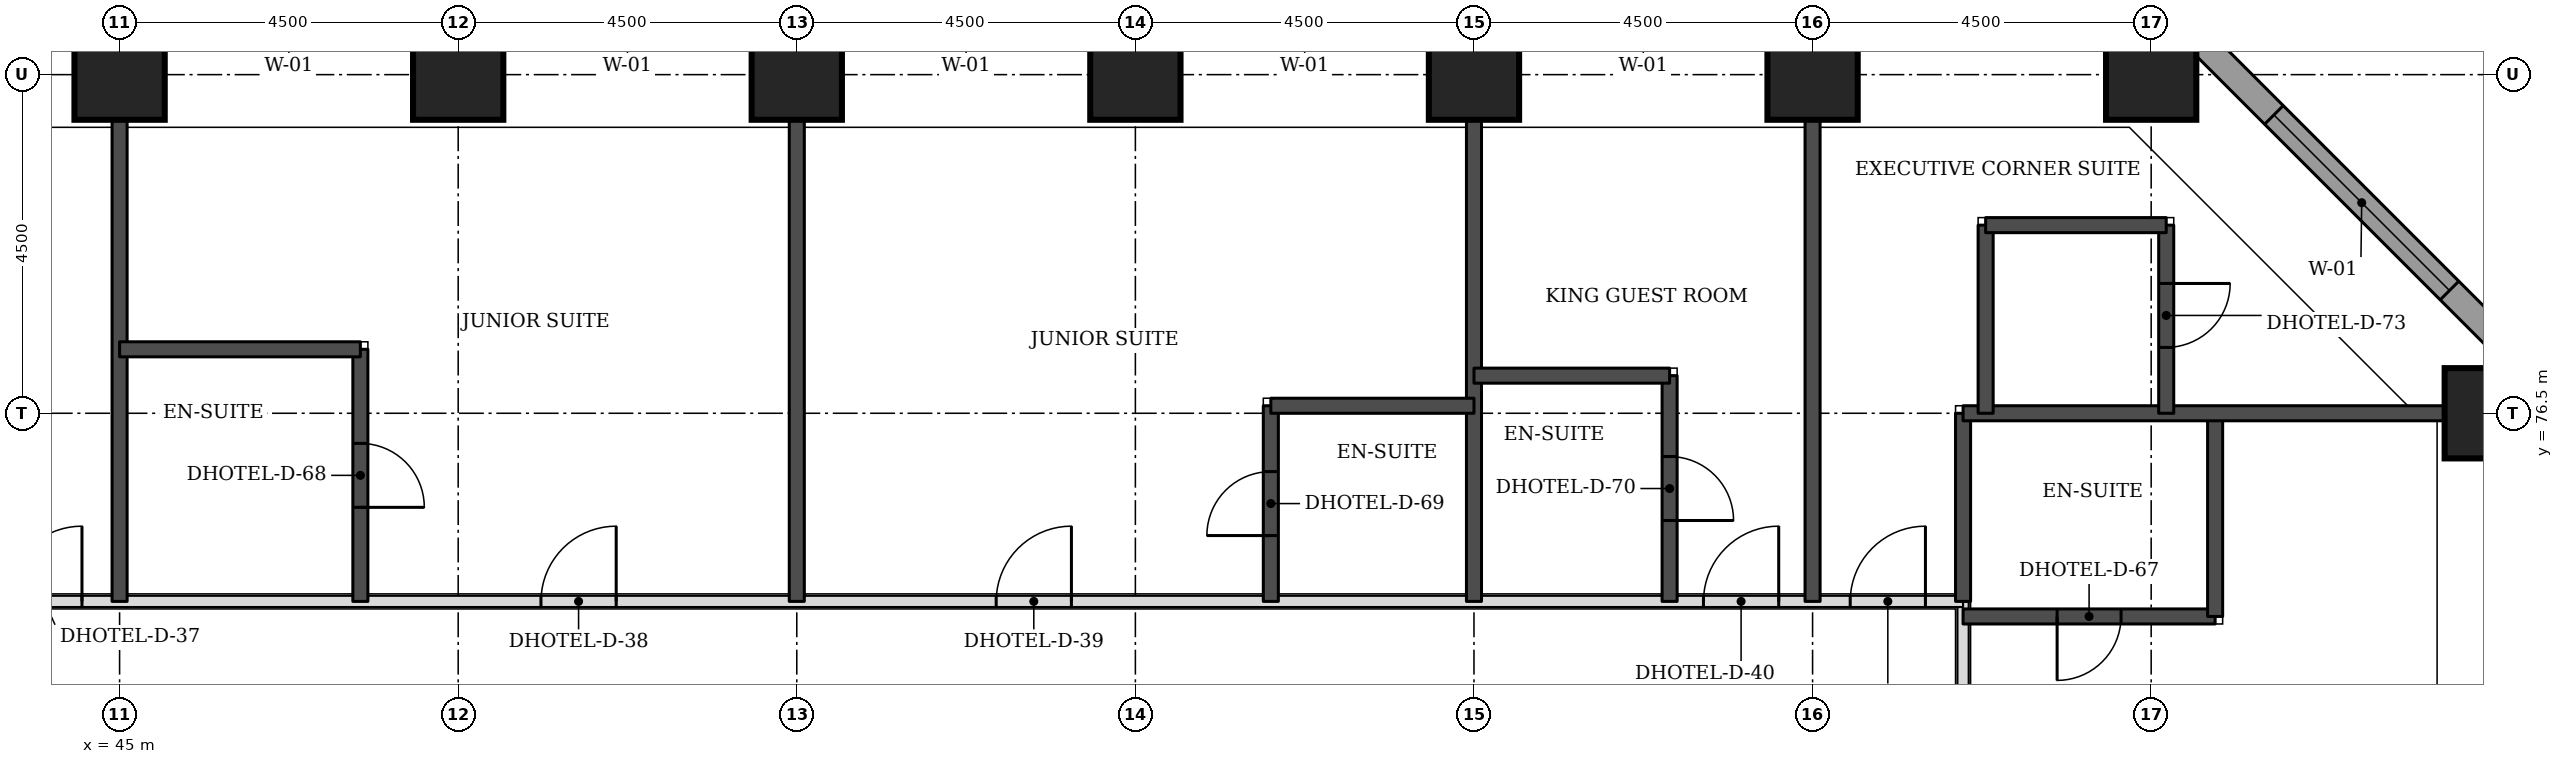
"""IFC4 building model, lengths in metres.
Left out: names, types, materials, properties, quantities, classifications, styles, units other than length and angle.
Written with IfcOpenShell. Run it as: python <this file> out.ifc"""

import sys

from ifc_helpers import new_model, si_unit, direction, frame, frame_2d, origin, origin_2d, place, context, subcontext, project, spatial, rectangle, extrude, element, fill, save


model = new_model("IFC4")
c1 = context("Model", 3, precision=1e-05, world=origin(), true_north=direction((0.0, 1.0)))
c2 = subcontext(c1, "Body", "Model", "MODEL_VIEW")
j1 = project(units=[si_unit("LENGTHUNIT", "METRE"), si_unit("PLANEANGLEUNIT", "RADIAN")], contexts=[c1])
p1 = place(None, origin())
s1 = spatial("IfcSite", under=j1, at=p1, CompositionType="ELEMENT")
p2 = place(p1, origin())
s2 = spatial("IfcBuilding", under=s1, at=p2, CompositionType="ELEMENT")
p3 = place(p2, frame((0.0, 0.0, 59.4)))
s3 = spatial("IfcBuildingStorey", under=s2, at=p3, CompositionType="ELEMENT", Elevation=59.4)
for number, where, z_axis, x_axis in (
    (1, (76.5, 76.5, 0.0), (0.0, 0.0, 1.0), (1.0, 0.0, 0.0)),
    (2, (45.0, 81.0, 0.0), (0.0, 0.0, 1.0), (1.0, 0.0, 0.0)),
    (3, (49.5, 81.0, 0.0), (0.0, 0.0, 1.0), (1.0, 0.0, 0.0)),
    (4, (54.0, 81.0, 0.0), (0.0, 0.0, 1.0), (1.0, 0.0, 0.0)),
    (5, (58.5, 81.0, 0.0), (0.0, 0.0, 1.0), (1.0, 0.0, 0.0)),
    (6, (63.0, 81.0, 0.0), (0.0, 0.0, 1.0), (1.0, 0.0, 0.0)),
    (7, (67.5, 81.0, 0.0), (0.0, 0.0, 1.0), (1.0, 0.0, 0.0)),
    (8, (72.0, 81.0, 0.0), (0.0, 0.0, 1.0), (1.0, 0.0, 0.0)),
):
    element("IfcColumn", number, at=place(p3, frame(where, z_axis=z_axis, x_axis=x_axis)), inside=s3, PredefinedType="COLUMN", context=c2, shape_type="SweptSolid", body=[
        extrude(rectangle(XDim=1.2, YDim=1.2, at=origin_2d()), origin(), (0.0, 0.0, 1.0), 3.3),
    ])
p4 = place(p3, frame((77.326, 76.77, 0.0), z_axis=(0.0, 0.0, 1.0), x_axis=(-0.707106781187, 0.707106781187, 0.0)))
e9 = element("IfcWall", 9, at=p4, inside=s3, PredefinedType="STANDARD", context=c2, shape_type="SweptSolid", body=[
    extrude(rectangle(XDim=7.151, YDim=0.35, at=frame_2d((3.576, 0.0))), origin(), (0.0, 0.0, 1.0), 3.055),
])
p5 = place(p4, frame((1.926, 0.0, 0.8)))
e10 = element("IfcOpeningElement", 10, at=p5, cuts=e9, PredefinedType="OPENING", context=c2, shape_type="SweptSolid", body=[
    extrude(rectangle(XDim=3.3, YDim=1.5, at=frame_2d((1.65, 0.75))), frame((0.0, 0.185, 0.0), z_axis=(0.0, -1.0, 0.0), x_axis=(1.0, 0.0, 0.0)), (0.0, 0.0, 1.0), 0.37),
])
p6 = place(p3, frame((69.5, 47.5, 0.0), z_axis=(0.0, 0.0, 1.0), x_axis=(0.0, 1.0, 0.0)))
e11 = element("IfcWall", 11, at=p6, inside=s3, PredefinedType="PARTITIONING", context=c2, shape_type="SweptSolid", body=[
    extrude(rectangle(XDim=26.5, YDim=0.15, at=frame_2d((13.25, 0.0))), origin(), (0.0, 0.0, 1.0), 3.08),
])
p7 = place(p6, frame((22.65, 0.0, 0.0)))
e12 = element("IfcOpeningElement", 12, at=p7, cuts=e11, PredefinedType="OPENING", context=c2, shape_type="SweptSolid", body=[
    extrude(rectangle(XDim=1.0, YDim=2.1, at=frame_2d((0.5, 1.05))), frame((0.0, 0.085, 0.0), z_axis=(0.0, -1.0, 0.0), x_axis=(1.0, 0.0, 0.0)), (0.0, 0.0, 1.0), 0.17),
])
p8 = place(p6, frame((16.6, 0.0, 0.0)))
e13 = element("IfcOpeningElement", 13, at=p8, cuts=e11, PredefinedType="OPENING", context=c2, shape_type="SweptSolid", body=[
    extrude(rectangle(XDim=1.0, YDim=2.1, at=frame_2d((0.5, 1.05))), frame((0.0, 0.085, 0.0), z_axis=(0.0, -1.0, 0.0), x_axis=(1.0, 0.0, 0.0)), (0.0, 0.0, 1.0), 0.17),
])
p9 = place(p6, frame((4.25, 0.0, 0.0)))
e14 = element("IfcOpeningElement", 14, at=p9, cuts=e11, PredefinedType="OPENING", context=c2, shape_type="SweptSolid", body=[
    extrude(rectangle(XDim=1.1, YDim=2.1, at=frame_2d((0.55, 1.05))), frame((0.0, 0.085, 0.0), z_axis=(0.0, -1.0, 0.0), x_axis=(1.0, 0.0, 0.0)), (0.0, 0.0, 1.0), 0.17),
])
p10 = place(p6, frame((0.55, 0.0, 0.0)))
e15 = element("IfcOpeningElement", 15, at=p10, cuts=e11, PredefinedType="OPENING", context=c2, shape_type="SweptSolid", body=[
    extrude(rectangle(XDim=1.0, YDim=2.1, at=frame_2d((0.5, 1.05))), frame((0.0, 0.085, 0.0), z_axis=(0.0, -1.0, 0.0), x_axis=(1.0, 0.0, 0.0)), (0.0, 0.0, 1.0), 0.17),
])
p11 = place(p3, frame((43.0, 74.0, 0.0), z_axis=(0.0, 0.0, 1.0), x_axis=(1.0, 0.0, 0.0)))
e16 = element("IfcWall", 16, at=p11, inside=s3, PredefinedType="PARTITIONING", context=c2, shape_type="SweptSolid", body=[
    extrude(rectangle(XDim=26.5, YDim=0.15, at=frame_2d((13.25, 0.0))), origin(), (0.0, 0.0, 1.0), 3.08),
])
p12 = place(p11, frame((7.6, 0.0, 0.0)))
e17 = element("IfcOpeningElement", 17, at=p12, cuts=e16, PredefinedType="OPENING", context=c2, shape_type="SweptSolid", body=[
    extrude(rectangle(XDim=1.0, YDim=2.1, at=frame_2d((0.5, 1.05))), frame((0.0, 0.085, 0.0), z_axis=(0.0, -1.0, 0.0), x_axis=(1.0, 0.0, 0.0)), (0.0, 0.0, 1.0), 0.17),
])
p13 = place(p11, frame((13.65, 0.0, 0.0)))
e18 = element("IfcOpeningElement", 18, at=p13, cuts=e16, PredefinedType="OPENING", context=c2, shape_type="SweptSolid", body=[
    extrude(rectangle(XDim=1.0, YDim=2.1, at=frame_2d((0.5, 1.05))), frame((0.0, 0.085, 0.0), z_axis=(0.0, -1.0, 0.0), x_axis=(1.0, 0.0, 0.0)), (0.0, 0.0, 1.0), 0.17),
])
p14 = place(p11, frame((23.05, 0.0, 0.0)))
e19 = element("IfcOpeningElement", 19, at=p14, cuts=e16, PredefinedType="OPENING", context=c2, shape_type="SweptSolid", body=[
    extrude(rectangle(XDim=1.0, YDim=2.1, at=frame_2d((0.5, 1.05))), frame((0.0, 0.085, 0.0), z_axis=(0.0, -1.0, 0.0), x_axis=(1.0, 0.0, 0.0)), (0.0, 0.0, 1.0), 0.17),
])
p15 = place(p11, frame((0.5, 0.0, 0.0)))
e20 = element("IfcOpeningElement", 20, at=p15, cuts=e16, PredefinedType="OPENING", context=c2, shape_type="SweptSolid", body=[
    extrude(rectangle(XDim=1.0, YDim=2.1, at=frame_2d((0.5, 1.05))), frame((0.0, 0.085, 0.0), z_axis=(0.0, -1.0, 0.0), x_axis=(1.0, 0.0, 0.0)), (0.0, 0.0, 1.0), 0.17),
])
p16 = place(p11, frame((25.0, 0.0, 0.0)))
e21 = element("IfcOpeningElement", 21, at=p16, cuts=e16, PredefinedType="OPENING", context=c2, shape_type="SweptSolid", body=[
    extrude(rectangle(XDim=1.0, YDim=2.1, at=frame_2d((0.5, 1.05))), frame((0.0, 0.085, 0.0), z_axis=(0.0, -1.0, 0.0), x_axis=(1.0, 0.0, 0.0)), (0.0, 0.0, 1.0), 0.17),
])
p17 = place(p3, frame((69.5, 73.8, 0.0), z_axis=(0.0, 0.0, 1.0), x_axis=(1.0, 0.0, 0.0)))
e22 = element("IfcWall", 22, at=p17, inside=s3, PredefinedType="SOLIDWALL", context=c2, shape_type="SweptSolid", body=[
    extrude(rectangle(XDim=3.35, YDim=0.2, at=frame_2d((1.675, 0.0))), origin(), (0.0, 0.0, 1.0), 3.08),
])
p18 = place(p17, frame((1.25, 0.0, 0.0)))
e23 = element("IfcOpeningElement", 23, at=p18, cuts=e22, PredefinedType="OPENING", context=c2, shape_type="SweptSolid", body=[
    extrude(rectangle(XDim=0.85, YDim=2.1, at=frame_2d((0.425, 1.05))), frame((0.0, 0.11, 0.0), z_axis=(0.0, -1.0, 0.0), x_axis=(1.0, 0.0, 0.0)), (0.0, 0.0, 1.0), 0.22),
])
p19 = place(p3, frame((72.85, 73.8, 0.0), z_axis=(0.0, 0.0, 1.0), x_axis=(0.0, 1.0, 0.0)))
e24 = element("IfcWall", 24, at=p19, inside=s3, PredefinedType="SOLIDWALL", context=c2, shape_type="SweptSolid", body=[
    extrude(rectangle(XDim=2.7, YDim=0.2, at=frame_2d((1.35, 0.0))), origin(), (0.0, 0.0, 1.0), 3.08),
])
p20 = place(p3, frame((45.0, 74.0, 0.0), z_axis=(0.0, 0.0, 1.0), x_axis=(0.0, 1.0, 0.0)))
e25 = element("IfcWall", 25, at=p20, inside=s3, PredefinedType="SOLIDWALL", context=c2, shape_type="SweptSolid", body=[
    extrude(rectangle(XDim=6.4, YDim=0.2, at=frame_2d((3.2, 0.0))), origin(), (0.0, 0.0, 1.0), 3.08),
])
p21 = place(p3, frame((48.2, 74.0, 0.0), z_axis=(0.0, 0.0, 1.0), x_axis=(0.0, 1.0, 0.0)))
e26 = element("IfcWall", 26, at=p21, inside=s3, PredefinedType="SOLIDWALL", context=c2, shape_type="SweptSolid", body=[
    extrude(rectangle(XDim=3.35, YDim=0.2, at=frame_2d((1.675, 0.0))), origin(), (0.0, 0.0, 1.0), 3.08),
])
p22 = place(p21, frame((1.25, 0.0, 0.0)))
e27 = element("IfcOpeningElement", 27, at=p22, cuts=e26, PredefinedType="OPENING", context=c2, shape_type="SweptSolid", body=[
    extrude(rectangle(XDim=0.85, YDim=2.1, at=frame_2d((0.425, 1.05))), frame((0.0, 0.11, 0.0), z_axis=(0.0, -1.0, 0.0), x_axis=(1.0, 0.0, 0.0)), (0.0, 0.0, 1.0), 0.22),
])
p23 = place(p3, frame((54.0, 74.0, 0.0), z_axis=(0.0, 0.0, 1.0), x_axis=(0.0, 1.0, 0.0)))
e28 = element("IfcWall", 28, at=p23, inside=s3, PredefinedType="SOLIDWALL", context=c2, shape_type="SweptSolid", body=[
    extrude(rectangle(XDim=6.4, YDim=0.2, at=frame_2d((3.2, 0.0))), origin(), (0.0, 0.0, 1.0), 3.08),
])
p24 = place(p3, frame((60.3, 74.0, 0.0), z_axis=(0.0, 0.0, 1.0), x_axis=(0.0, 1.0, 0.0)))
e29 = element("IfcWall", 29, at=p24, inside=s3, PredefinedType="SOLIDWALL", context=c2, shape_type="SweptSolid", body=[
    extrude(rectangle(XDim=2.6, YDim=0.2, at=frame_2d((1.3, 0.0))), origin(), (0.0, 0.0, 1.0), 3.08),
])
p25 = place(p24, frame((0.875, 0.0, 0.0)))
e30 = element("IfcOpeningElement", 30, at=p25, cuts=e29, PredefinedType="OPENING", context=c2, shape_type="SweptSolid", body=[
    extrude(rectangle(XDim=0.85, YDim=2.1, at=frame_2d((0.425, 1.05))), frame((0.0, 0.11, 0.0), z_axis=(0.0, -1.0, 0.0), x_axis=(1.0, 0.0, 0.0)), (0.0, 0.0, 1.0), 0.22),
])
p26 = place(p3, frame((63.0, 74.0, 0.0), z_axis=(0.0, 0.0, 1.0), x_axis=(0.0, 1.0, 0.0)))
e31 = element("IfcWall", 31, at=p26, inside=s3, PredefinedType="SOLIDWALL", context=c2, shape_type="SweptSolid", body=[
    extrude(rectangle(XDim=6.4, YDim=0.2, at=frame_2d((3.2, 0.0))), origin(), (0.0, 0.0, 1.0), 3.08),
])
p27 = place(p3, frame((65.6, 74.0, 0.0), z_axis=(0.0, 0.0, 1.0), x_axis=(0.0, 1.0, 0.0)))
e32 = element("IfcWall", 32, at=p27, inside=s3, PredefinedType="SOLIDWALL", context=c2, shape_type="SweptSolid", body=[
    extrude(rectangle(XDim=3.0, YDim=0.2, at=frame_2d((1.5, 0.0))), origin(), (0.0, 0.0, 1.0), 3.08),
])
p28 = place(p27, frame((1.075, 0.0, 0.0)))
e33 = element("IfcOpeningElement", 33, at=p28, cuts=e32, PredefinedType="OPENING", context=c2, shape_type="SweptSolid", body=[
    extrude(rectangle(XDim=0.85, YDim=2.1, at=frame_2d((0.425, 1.05))), frame((0.0, 0.11, 0.0), z_axis=(0.0, -1.0, 0.0), x_axis=(1.0, 0.0, 0.0)), (0.0, 0.0, 1.0), 0.22),
])
p29 = place(p3, frame((67.5, 74.0, 0.0), z_axis=(0.0, 0.0, 1.0), x_axis=(0.0, 1.0, 0.0)))
e34 = element("IfcWall", 34, at=p29, inside=s3, PredefinedType="SOLIDWALL", context=c2, shape_type="SweptSolid", body=[
    extrude(rectangle(XDim=6.4, YDim=0.2, at=frame_2d((3.2, 0.0))), origin(), (0.0, 0.0, 1.0), 3.08),
])
p30 = place(p3, frame((69.5, 74.0, 0.0), z_axis=(0.0, 0.0, 1.0), x_axis=(0.0, 1.0, 0.0)))
e35 = element("IfcWall", 35, at=p30, inside=s3, PredefinedType="SOLIDWALL", context=c2, shape_type="SweptSolid", body=[
    extrude(rectangle(XDim=2.5, YDim=0.2, at=frame_2d((1.25, 0.0))), origin(), (0.0, 0.0, 1.0), 3.08),
])
p31 = place(p3, frame((69.5, 76.5, 0.0), z_axis=(0.0, 0.0, 1.0), x_axis=(1.0, 0.0, 0.0)))
e36 = element("IfcWall", 36, at=p31, inside=s3, PredefinedType="SOLIDWALL", context=c2, shape_type="SweptSolid", body=[
    extrude(rectangle(XDim=6.4, YDim=0.2, at=frame_2d((3.2, 0.0))), origin(), (0.0, 0.0, 1.0), 3.08),
])
p32 = place(p3, frame((69.8, 76.5, 0.0), z_axis=(0.0, 0.0, 1.0), x_axis=(0.0, 1.0, 0.0)))
e37 = element("IfcWall", 37, at=p32, inside=s3, PredefinedType="SOLIDWALL", context=c2, shape_type="SweptSolid", body=[
    extrude(rectangle(XDim=2.5, YDim=0.2, at=frame_2d((1.25, 0.0))), origin(), (0.0, 0.0, 1.0), 3.08),
])
p33 = place(p3, frame((72.2, 76.5, 0.0), z_axis=(0.0, 0.0, 1.0), x_axis=(0.0, 1.0, 0.0)))
e38 = element("IfcWall", 38, at=p33, inside=s3, PredefinedType="SOLIDWALL", context=c2, shape_type="SweptSolid", body=[
    extrude(rectangle(XDim=2.5, YDim=0.2, at=frame_2d((1.25, 0.0))), origin(), (0.0, 0.0, 1.0), 3.08),
])
p34 = place(p33, frame((0.875, 0.0, 0.0)))
e39 = element("IfcOpeningElement", 39, at=p34, cuts=e38, PredefinedType="OPENING", context=c2, shape_type="SweptSolid", body=[
    extrude(rectangle(XDim=0.85, YDim=2.1, at=frame_2d((0.425, 1.05))), frame((0.0, 0.11, 0.0), z_axis=(0.0, -1.0, 0.0), x_axis=(1.0, 0.0, 0.0)), (0.0, 0.0, 1.0), 0.22),
])
p35 = place(p3, frame((60.3, 76.6, 0.0), z_axis=(0.0, 0.0, 1.0), x_axis=(1.0, 0.0, 0.0)))
e40 = element("IfcWall", 40, at=p35, inside=s3, PredefinedType="SOLIDWALL", context=c2, shape_type="SweptSolid", body=[
    extrude(rectangle(XDim=2.7, YDim=0.2, at=frame_2d((1.35, 0.0))), origin(), (0.0, 0.0, 1.0), 3.08),
])
p36 = place(p3, frame((63.0, 77.0, 0.0), z_axis=(0.0, 0.0, 1.0), x_axis=(1.0, 0.0, 0.0)))
e41 = element("IfcWall", 41, at=p36, inside=s3, PredefinedType="SOLIDWALL", context=c2, shape_type="SweptSolid", body=[
    extrude(rectangle(XDim=2.6, YDim=0.2, at=frame_2d((1.3, 0.0))), origin(), (0.0, 0.0, 1.0), 3.08),
])
p37 = place(p3, frame((45.0, 77.35, 0.0), z_axis=(0.0, 0.0, 1.0), x_axis=(1.0, 0.0, 0.0)))
e42 = element("IfcWall", 42, at=p37, inside=s3, PredefinedType="SOLIDWALL", context=c2, shape_type="SweptSolid", body=[
    extrude(rectangle(XDim=3.2, YDim=0.2, at=frame_2d((1.6, 0.0))), origin(), (0.0, 0.0, 1.0), 3.08),
])
p38 = place(p3, frame((69.8, 79.0, 0.0), z_axis=(0.0, 0.0, 1.0), x_axis=(1.0, 0.0, 0.0)))
e43 = element("IfcWall", 43, at=p38, inside=s3, PredefinedType="SOLIDWALL", context=c2, shape_type="SweptSolid", body=[
    extrude(rectangle(XDim=2.4, YDim=0.2, at=frame_2d((1.2, 0.0))), origin(), (0.0, 0.0, 1.0), 3.08),
])
p39 = place(p5, origin())
e44 = element("IfcWindow", 44, at=p39, inside=s3, PartitioningType="SINGLE_PANEL", PredefinedType="WINDOW", context=c2, shape_type="SweptSolid", body=[
    extrude(rectangle(XDim=3.3, YDim=1.5, at=frame_2d((1.65, 0.75))), frame((0.0, 0.085, 0.0), z_axis=(0.0, -1.0, 0.0), x_axis=(1.0, 0.0, 0.0)), (0.0, 0.0, 1.0), 0.06),
])
fill(e10, e44)
p40 = place(p12, origin())
e45 = element("IfcDoor", 45, at=p40, inside=s3, OperationType="SINGLE_SWING_RIGHT", PredefinedType="DOOR", context=c2, shape_type="SweptSolid", body=[
    extrude(rectangle(XDim=1.0, YDim=2.1, at=frame_2d((0.5, 1.05))), frame((0.0, 0.025, 0.0), z_axis=(0.0, -1.0, 0.0), x_axis=(1.0, 0.0, 0.0)), (0.0, 0.0, 1.0), 0.05),
])
fill(e17, e45)
p41 = place(p22, frame((0.85, 0.0, 0.0), z_axis=(0.0, 0.0, 1.0), x_axis=(-1.0, 0.0, 0.0)))
e46 = element("IfcDoor", 46, at=p41, inside=s3, OperationType="SINGLE_SWING_RIGHT", PredefinedType="DOOR", context=c2, shape_type="SweptSolid", body=[
    extrude(rectangle(XDim=0.85, YDim=2.1, at=frame_2d((0.425, 1.05))), frame((0.0, 0.025, 0.0), z_axis=(0.0, -1.0, 0.0), x_axis=(1.0, 0.0, 0.0)), (0.0, 0.0, 1.0), 0.05),
])
fill(e27, e46)
p42 = place(p13, origin())
e47 = element("IfcDoor", 47, at=p42, inside=s3, OperationType="SINGLE_SWING_RIGHT", PredefinedType="DOOR", context=c2, shape_type="SweptSolid", body=[
    extrude(rectangle(XDim=1.0, YDim=2.1, at=frame_2d((0.5, 1.05))), frame((0.0, 0.025, 0.0), z_axis=(0.0, -1.0, 0.0), x_axis=(1.0, 0.0, 0.0)), (0.0, 0.0, 1.0), 0.05),
])
fill(e18, e47)
p43 = place(p25, origin())
e48 = element("IfcDoor", 48, at=p43, inside=s3, OperationType="SINGLE_SWING_LEFT", PredefinedType="DOOR", context=c2, shape_type="SweptSolid", body=[
    extrude(rectangle(XDim=0.85, YDim=2.1, at=frame_2d((0.425, 1.05))), frame((0.0, 0.025, 0.0), z_axis=(0.0, -1.0, 0.0), x_axis=(1.0, 0.0, 0.0)), (0.0, 0.0, 1.0), 0.05),
])
fill(e30, e48)
p44 = place(p14, origin())
e49 = element("IfcDoor", 49, at=p44, inside=s3, OperationType="SINGLE_SWING_RIGHT", PredefinedType="DOOR", context=c2, shape_type="SweptSolid", body=[
    extrude(rectangle(XDim=1.0, YDim=2.1, at=frame_2d((0.5, 1.05))), frame((0.0, 0.025, 0.0), z_axis=(0.0, -1.0, 0.0), x_axis=(1.0, 0.0, 0.0)), (0.0, 0.0, 1.0), 0.05),
])
fill(e19, e49)
p45 = place(p28, frame((0.85, 0.0, 0.0), z_axis=(0.0, 0.0, 1.0), x_axis=(-1.0, 0.0, 0.0)))
e50 = element("IfcDoor", 50, at=p45, inside=s3, OperationType="SINGLE_SWING_RIGHT", PredefinedType="DOOR", context=c2, shape_type="SweptSolid", body=[
    extrude(rectangle(XDim=0.85, YDim=2.1, at=frame_2d((0.425, 1.05))), frame((0.0, 0.025, 0.0), z_axis=(0.0, -1.0, 0.0), x_axis=(1.0, 0.0, 0.0)), (0.0, 0.0, 1.0), 0.05),
])
fill(e33, e50)
p46 = place(p18, frame((0.85, 0.0, 0.0), z_axis=(0.0, 0.0, 1.0), x_axis=(-1.0, 0.0, 0.0)))
e51 = element("IfcDoor", 51, at=p46, inside=s3, OperationType="SINGLE_SWING_RIGHT", PredefinedType="DOOR", context=c2, shape_type="SweptSolid", body=[
    extrude(rectangle(XDim=0.85, YDim=2.1, at=frame_2d((0.425, 1.05))), frame((0.0, 0.025, 0.0), z_axis=(0.0, -1.0, 0.0), x_axis=(1.0, 0.0, 0.0)), (0.0, 0.0, 1.0), 0.05),
])
fill(e23, e51)
p47 = place(p15, origin())
e52 = element("IfcDoor", 52, at=p47, inside=s3, OperationType="SINGLE_SWING_RIGHT", PredefinedType="DOOR", context=c2, shape_type="SweptSolid", body=[
    extrude(rectangle(XDim=1.0, YDim=2.1, at=frame_2d((0.5, 1.05))), frame((0.0, 0.025, 0.0), z_axis=(0.0, -1.0, 0.0), x_axis=(1.0, 0.0, 0.0)), (0.0, 0.0, 1.0), 0.05),
])
fill(e20, e52)
p48 = place(p16, origin())
e53 = element("IfcDoor", 53, at=p48, inside=s3, OperationType="SINGLE_SWING_RIGHT", PredefinedType="DOOR", context=c2, shape_type="SweptSolid", body=[
    extrude(rectangle(XDim=1.0, YDim=2.1, at=frame_2d((0.5, 1.05))), frame((0.0, 0.025, 0.0), z_axis=(0.0, -1.0, 0.0), x_axis=(1.0, 0.0, 0.0)), (0.0, 0.0, 1.0), 0.05),
])
fill(e21, e53)
p49 = place(p34, frame((0.85, 0.0, 0.0), z_axis=(0.0, 0.0, 1.0), x_axis=(-1.0, 0.0, 0.0)))
e54 = element("IfcDoor", 54, at=p49, inside=s3, OperationType="SINGLE_SWING_LEFT", PredefinedType="DOOR", context=c2, shape_type="SweptSolid", body=[
    extrude(rectangle(XDim=0.85, YDim=2.1, at=frame_2d((0.425, 1.05))), frame((0.0, 0.025, 0.0), z_axis=(0.0, -1.0, 0.0), x_axis=(1.0, 0.0, 0.0)), (0.0, 0.0, 1.0), 0.05),
])
fill(e39, e54)
save(model, sys.argv[1])
